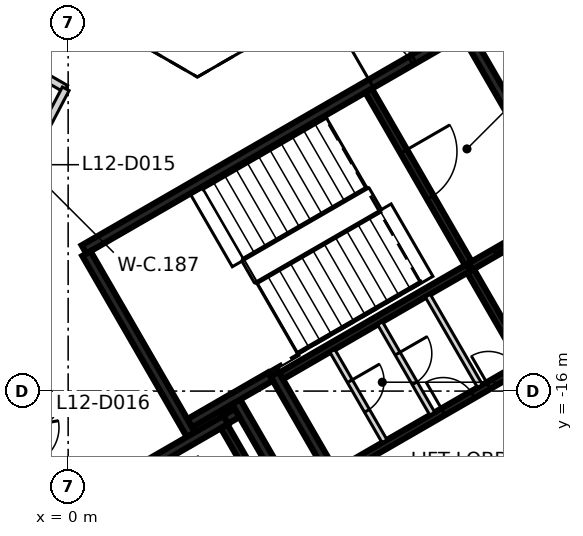
"""IFC4 building model, lengths in metres.
Left out: names, types, materials, properties, quantities, classifications, styles, units other than length and angle.
Written with IfcOpenShell. Run it as: python <this file> out.ifc"""

import sys

from ifc_helpers import new_model, si_unit, direction, frame, frame_2d, origin, place, context, subcontext, project, spatial, rectangle, extrude, element, fill, save


model = new_model("IFC4")
c1 = context("Model", 3, precision=1e-05, world=origin(), true_north=direction((0.0, 1.0)))
c2 = subcontext(c1, "Body", "Model", "MODEL_VIEW")
j1 = project(units=[si_unit("LENGTHUNIT", "METRE"), si_unit("PLANEANGLEUNIT", "RADIAN")], contexts=[c1])
p1 = place(None, origin())
s1 = spatial("IfcSite", under=j1, at=p1, CompositionType="ELEMENT")
p2 = place(p1, origin())
s2 = spatial("IfcBuilding", under=s1, at=p2, CompositionType="ELEMENT")
p3 = place(p2, frame((0.0, 0.0, 56.6)))
s3 = spatial("IfcBuildingStorey", under=s2, at=p3, CompositionType="ELEMENT", Elevation=56.6)
p4 = place(p3, frame((0.417, -12.273, 0.0), z_axis=(0.0, 0.0, 1.0), x_axis=(0.866021906294, 0.500006057782, 0.0)))
e1 = element("IfcWall", 1, at=p4, inside=s3, PredefinedType="SHEAR", context=c2, shape_type="SweptSolid", body=[
    extrude(rectangle(XDim=11.55, YDim=0.25, at=frame_2d((5.775, 0.0))), origin(), (0.0, 0.0, 1.0), 3.125),
])
p5 = place(p4, frame((10.025, 0.0, 0.0)))
e2 = element("IfcOpeningElement", 2, at=p5, cuts=e1, PredefinedType="OPENING", context=c2, shape_type="SweptSolid", body=[
    extrude(rectangle(XDim=1.2, YDim=2.1, at=frame_2d((0.6, 1.05))), frame((0.0, 0.135, 0.0), z_axis=(0.0, -1.0, 0.0), x_axis=(1.0, 0.0, 0.0)), (0.0, 0.0, 1.0), 0.27),
])
p6 = place(p4, frame((8.725, 0.0, 0.0)))
e3 = element("IfcOpeningElement", 3, at=p6, cuts=e1, PredefinedType="OPENING", context=c2, shape_type="SweptSolid", body=[
    extrude(rectangle(XDim=1.2, YDim=2.1, at=frame_2d((0.6, 1.05))), frame((0.0, 0.135, 0.0), z_axis=(0.0, -1.0, 0.0), x_axis=(1.0, 0.0, 0.0)), (0.0, 0.0, 1.0), 0.27),
])
p7 = place(p3, frame((3.235, -17.153, 0.0), z_axis=(0.0, 0.0, 1.0), x_axis=(-0.500008851346, 0.866020293397, 0.0)))
e4 = element("IfcWall", 4, at=p7, inside=s3, PredefinedType="SHEAR", context=c2, shape_type="SweptSolid", body=[
    extrude(rectangle(XDim=5.51, YDim=0.25, at=frame_2d((2.755, 0.0))), origin(), (0.0, 0.0, 1.0), 3.125),
])
p8 = place(p3, frame((10.483, -6.606, 0.0), z_axis=(0.0, 0.0, 1.0), x_axis=(0.49999885962, -0.866026062182, 0.0)))
e5 = element("IfcWall", 5, at=p8, inside=s3, PredefinedType="SHEAR", context=c2, shape_type="SweptSolid", body=[
    extrude(rectangle(XDim=5.225, YDim=0.25, at=frame_2d((2.612, 0.0))), origin(), (0.0, 0.0, 1.0), 3.125),
])
p9 = place(p3, frame((7.031, -18.327, 0.0), z_axis=(0.0, 0.0, 1.0), x_axis=(-0.499971222258, 0.866042017984, 0.0)))
e6 = element("IfcWall", 6, at=p9, inside=s3, PredefinedType="SHEAR", context=c2, shape_type="SweptSolid", body=[
    extrude(rectangle(XDim=3.2, YDim=0.25, at=frame_2d((1.6, 0.0))), origin(), (0.0, 0.0, 1.0), 3.125),
])
p10 = place(p3, frame((1.669, -18.19, 0.0), z_axis=(0.0, 0.0, 1.0), x_axis=(0.866042235819, 0.499970844928, 0.0)))
e7 = element("IfcWall", 7, at=p10, inside=s3, PredefinedType="SHEAR", context=c2, shape_type="SweptSolid", body=[
    extrude(rectangle(XDim=2.865, YDim=0.25, at=frame_2d((1.432, 0.0))), origin(), (0.0, 0.0, 1.0), 3.125),
])
p11 = place(p3, frame((4.414, -16.276, 0.0), z_axis=(0.0, 0.0, 1.0), x_axis=(0.500003324108, -0.866023484601, 0.0)))
e8 = element("IfcWall", 8, at=p11, inside=s3, PredefinedType="SHEAR", context=c2, shape_type="SweptSolid", body=[
    extrude(rectangle(XDim=3.085, YDim=0.25, at=frame_2d((1.542, 0.0))), origin(), (0.0, 0.0, 1.0), 3.125),
])
p12 = place(p3, frame((5.322, -15.619, 0.0), z_axis=(0.0, 0.0, 1.0), x_axis=(-0.866026229868, -0.499998569178, 0.0)))
e9 = element("IfcWall", 9, at=p12, inside=s3, PredefinedType="SHEAR", context=c2, shape_type="SweptSolid", body=[
    extrude(rectangle(XDim=2.449, YDim=0.25, at=frame_2d((1.225, 0.0))), origin(), (0.0, 0.0, 1.0), 3.125),
])
p13 = place(p3, frame((4.145, -16.749, 0.0), z_axis=(0.0, 0.0, 1.0), x_axis=(0.866185586049, 0.49972245349, 0.0)))
e10 = element("IfcWall", 10, at=p13, inside=s3, PredefinedType="SHEAR", context=c2, shape_type="SweptSolid", body=[
    extrude(rectangle(XDim=0.344, YDim=0.25, at=frame_2d((0.172, 0.0))), origin(), (0.0, 0.0, 1.0), 3.125),
])
p14 = place(p3, frame((9.052, -20.48, 0.0), z_axis=(0.0, 0.0, 1.0), x_axis=(0.866030299012, 0.499991521122, 0.0)))
e11 = element("IfcWall", 11, at=p14, inside=s3, PredefinedType="SHEAR", context=c2, shape_type="SweptSolid", body=[
    extrude(rectangle(XDim=6.1, YDim=0.2, at=frame_2d((3.05, 0.0))), origin(), (0.0, 0.0, 1.0), 3.125),
])
p15 = place(p14, frame((1.0, 0.0, 0.0)))
e12 = element("IfcOpeningElement", 12, at=p15, cuts=e11, PredefinedType="OPENING", context=c2, shape_type="SweptSolid", body=[
    extrude(rectangle(XDim=1.2, YDim=2.1, at=frame_2d((0.6, 1.05))), frame((0.0, 0.11, 0.0), z_axis=(0.0, -1.0, 0.0), x_axis=(1.0, 0.0, 0.0)), (0.0, 0.0, 1.0), 0.22),
])
p16 = place(p14, frame((4.05, 0.0, 0.0)))
e13 = element("IfcOpeningElement", 13, at=p16, cuts=e11, PredefinedType="OPENING", context=c2, shape_type="SweptSolid", body=[
    extrude(rectangle(XDim=1.2, YDim=2.1, at=frame_2d((0.6, 1.05))), frame((0.0, 0.11, 0.0), z_axis=(0.0, -1.0, 0.0), x_axis=(1.0, 0.0, 0.0)), (0.0, 0.0, 1.0), 0.22),
])
p17 = place(p3, frame((10.538, -12.752, 0.0), z_axis=(0.0, 0.0, 1.0), x_axis=(-0.866038630372, -0.499977090179, 0.0)))
e14 = element("IfcWall", 14, at=p17, inside=s3, PredefinedType="SHEAR", context=c2, shape_type="SweptSolid", body=[
    extrude(rectangle(XDim=5.699, YDim=0.2, at=frame_2d((2.85, 0.0))), origin(), (0.0, 0.0, 1.0), 3.125),
])
p18 = place(p3, frame((7.077, -18.156, 0.0), z_axis=(0.0, 0.0, 1.0), x_axis=(0.866038630372, 0.499977090179, 0.0)))
e15 = element("IfcWall", 15, at=p18, inside=s3, PredefinedType="SHEAR", context=c2, shape_type="SweptSolid", body=[
    extrude(rectangle(XDim=5.699, YDim=0.2, at=frame_2d((2.85, 0.0))), origin(), (0.0, 0.0, 1.0), 3.125),
])
p19 = place(p18, frame((3.224, 0.0, 0.0)))
e16 = element("IfcOpeningElement", 16, at=p19, cuts=e15, PredefinedType="OPENING", context=c2, shape_type="SweptSolid", body=[
    extrude(rectangle(XDim=0.9, YDim=2.1, at=frame_2d((0.45, 1.05))), frame((0.0, 0.11, 0.0), z_axis=(0.0, -1.0, 0.0), x_axis=(1.0, 0.0, 0.0)), (0.0, 0.0, 1.0), 0.22),
])
p20 = place(p18, frame((4.599, 0.0, 0.0)))
e17 = element("IfcOpeningElement", 17, at=p20, cuts=e15, PredefinedType="OPENING", context=c2, shape_type="SweptSolid", body=[
    extrude(rectangle(XDim=0.9, YDim=2.1, at=frame_2d((0.45, 1.05))), frame((0.0, 0.11, 0.0), z_axis=(0.0, -1.0, 0.0), x_axis=(1.0, 0.0, 0.0)), (0.0, 0.0, 1.0), 0.22),
])
p21 = place(p3, frame((7.906, -8.094, 0.0), z_axis=(0.0, 0.0, 1.0), x_axis=(0.500024287448, -0.866011380966, 0.0)))
e18 = element("IfcWall", 18, at=p21, inside=s3, PredefinedType="SHEAR", context=c2, shape_type="SweptSolid", body=[
    extrude(rectangle(XDim=5.251, YDim=0.2, at=frame_2d((2.625, 0.0))), origin(), (0.0, 0.0, 1.0), 3.125),
])
p22 = place(p21, frame((1.849, 0.0, 0.0)))
e19 = element("IfcOpeningElement", 19, at=p22, cuts=e18, PredefinedType="OPENING", context=c2, shape_type="SweptSolid", body=[
    extrude(rectangle(XDim=1.4, YDim=2.1, at=frame_2d((0.7, 1.05))), frame((0.0, 0.11, 0.0), z_axis=(0.0, -1.0, 0.0), x_axis=(1.0, 0.0, 0.0)), (0.0, 0.0, 1.0), 0.22),
])
p23 = place(p3, frame((5.503, -19.352, 0.0), z_axis=(0.0, 0.0, 1.0), x_axis=(-0.499986818241, 0.866033014143, 0.0)))
e20 = element("IfcWall", 20, at=p23, inside=s3, PredefinedType="SHEAR", context=c2, shape_type="SweptSolid", body=[
    extrude(rectangle(XDim=2.798, YDim=0.2, at=frame_2d((1.399, 0.0))), origin(), (0.0, 0.0, 1.0), 3.125),
])
p24 = place(p23, frame((0.949, 0.0, 0.0)))
e21 = element("IfcOpeningElement", 21, at=p24, cuts=e20, PredefinedType="OPENING", context=c2, shape_type="SweptSolid", body=[
    extrude(rectangle(XDim=0.9, YDim=2.1, at=frame_2d((0.45, 1.05))), frame((0.0, 0.11, 0.0), z_axis=(0.0, -1.0, 0.0), x_axis=(1.0, 0.0, 0.0)), (0.0, 0.0, 1.0), 0.22),
])
p25 = place(p3, frame((11.963, -15.22, 0.0), z_axis=(0.0, 0.0, 1.0), x_axis=(-0.500034990121, 0.866005201286, 0.0)))
e22 = element("IfcWall", 22, at=p25, inside=s3, PredefinedType="SHEAR", context=c2, shape_type="SweptSolid", body=[
    extrude(rectangle(XDim=2.75, YDim=0.2, at=frame_2d((1.375, 0.0))), origin(), (0.0, 0.0, 1.0), 3.125),
])
p26 = place(p3, frame((10.587, -12.723, 0.0), z_axis=(0.0, 0.0, 1.0), x_axis=(0.866037306777, 0.499979382845, 0.0)))
e23 = element("IfcWall", 23, at=p26, inside=s3, PredefinedType="SHEAR", context=c2, shape_type="SweptSolid", body=[
    extrude(rectangle(XDim=2.742, YDim=0.2, at=frame_2d((1.371, 0.0))), origin(), (0.0, 0.0, 1.0), 3.125),
])
p27 = place(p26, frame((0.743, 0.0, 0.0)))
e24 = element("IfcOpeningElement", 24, at=p27, cuts=e23, PredefinedType="OPENING", context=c2, shape_type="SweptSolid", body=[
    extrude(rectangle(XDim=1.3, YDim=2.1, at=frame_2d((0.65, 1.05))), frame((0.0, 0.11, 0.0), z_axis=(0.0, -1.0, 0.0), x_axis=(1.0, 0.0, 0.0)), (0.0, 0.0, 1.0), 0.22),
])
p28 = place(p3, frame((8.207, -14.214, 0.0), z_axis=(0.0, 0.0, 1.0), x_axis=(0.50002746344, -0.86600954718, 0.0)))
e25 = element("IfcWall", 25, at=p28, inside=s3, PredefinedType="PARTITIONING", context=c2, shape_type="SweptSolid", body=[
    extrude(rectangle(XDim=2.748, YDim=0.15, at=frame_2d((1.374, 0.0))), origin(), (0.0, 0.0, 1.0), 3.125),
])
p29 = place(p28, frame((0.924, 0.0, 0.0)))
e26 = element("IfcOpeningElement", 26, at=p29, cuts=e25, PredefinedType="OPENING", context=c2, shape_type="SweptSolid", body=[
    extrude(rectangle(XDim=0.9, YDim=2.1, at=frame_2d((0.45, 1.05))), frame((0.0, 0.085, 0.0), z_axis=(0.0, -1.0, 0.0), x_axis=(1.0, 0.0, 0.0)), (0.0, 0.0, 1.0), 0.17),
])
p30 = place(p3, frame((9.462, -13.489, 0.0), z_axis=(0.0, 0.0, 1.0), x_axis=(0.499988999718, -0.866031754707, 0.0)))
e27 = element("IfcWall", 27, at=p30, inside=s3, PredefinedType="PARTITIONING", context=c2, shape_type="SweptSolid", body=[
    extrude(rectangle(XDim=2.749, YDim=0.15, at=frame_2d((1.374, 0.0))), origin(), (0.0, 0.0, 1.0), 3.125),
])
p31 = place(p3, frame((6.951, -14.939, 0.0), z_axis=(0.0, 0.0, 1.0), x_axis=(0.499988999718, -0.866031754707, 0.0)))
e28 = element("IfcWall", 28, at=p31, inside=s3, PredefinedType="PARTITIONING", context=c2, shape_type="SweptSolid", body=[
    extrude(rectangle(XDim=2.749, YDim=0.15, at=frame_2d((1.374, 0.0))), origin(), (0.0, 0.0, 1.0), 3.125),
])
p32 = place(p31, frame((0.924, 0.0, 0.0)))
e29 = element("IfcOpeningElement", 29, at=p32, cuts=e28, PredefinedType="OPENING", context=c2, shape_type="SweptSolid", body=[
    extrude(rectangle(XDim=0.9, YDim=2.1, at=frame_2d((0.45, 1.05))), frame((0.0, 0.085, 0.0), z_axis=(0.0, -1.0, 0.0), x_axis=(1.0, 0.0, 0.0)), (0.0, 0.0, 1.0), 0.17),
])
p33 = place(p3, frame((-7.589, -3.702, 0.0), z_axis=(0.0, 0.0, 1.0), x_axis=(0.865995139556, -0.500052415518, 0.0)))
e30 = element("IfcWall", 30, at=p33, inside=s3, PredefinedType="PARTITIONING", context=c2, shape_type="SweptSolid", body=[
    extrude(rectangle(XDim=8.689, YDim=0.2, at=frame_2d((4.344, 0.0))), origin(), (0.0, 0.0, 1.0), 3.125),
])
p34 = place(p33, frame((0.749, 0.0, 0.0)))
e31 = element("IfcOpeningElement", 31, at=p34, cuts=e30, PredefinedType="OPENING", context=c2, shape_type="SweptSolid", body=[
    extrude(rectangle(XDim=1.0, YDim=2.1, at=frame_2d((0.5, 1.05))), frame((0.0, 0.11, 0.0), z_axis=(0.0, -1.0, 0.0), x_axis=(1.0, 0.0, 0.0)), (0.0, 0.0, 1.0), 0.22),
])
p35 = place(p33, frame((5.819, 0.0, 0.0)))
e32 = element("IfcOpeningElement", 32, at=p35, cuts=e30, PredefinedType="OPENING", context=c2, shape_type="SweptSolid", body=[
    extrude(rectangle(XDim=0.95, YDim=2.1, at=frame_2d((0.475, 1.05))), frame((0.0, 0.11, 0.0), z_axis=(0.0, -1.0, 0.0), x_axis=(1.0, 0.0, 0.0)), (0.0, 0.0, 1.0), 0.22),
])
p36 = place(p3, frame((-2.162, -12.041, 0.0), z_axis=(0.0, 0.0, 1.0), x_axis=(0.464956890881, 0.885333321197, 0.0)))
e33 = element("IfcWall", 33, at=p36, inside=s3, PredefinedType="PARTITIONING", context=c2, shape_type="SweptSolid", body=[
    extrude(rectangle(XDim=4.512, YDim=0.2, at=frame_2d((2.256, 0.0))), origin(), (0.0, 0.0, 1.0), 3.125),
])
p37 = place(p36, frame((1.756, 0.0, 0.0)))
e34 = element("IfcOpeningElement", 34, at=p37, cuts=e33, PredefinedType="OPENING", context=c2, shape_type="SweptSolid", body=[
    extrude(rectangle(XDim=1.0, YDim=2.1, at=frame_2d((0.5, 1.05))), frame((0.0, 0.11, 0.0), z_axis=(0.0, -1.0, 0.0), x_axis=(1.0, 0.0, 0.0)), (0.0, 0.0, 1.0), 0.22),
])
p38 = place(p27, origin())
e35 = element("IfcDoor", 35, at=p38, inside=s3, OperationType="SLIDING_TO_LEFT", PredefinedType="DOOR", context=c2, shape_type="SweptSolid", body=[
    extrude(rectangle(XDim=1.3, YDim=2.1, at=frame_2d((0.65, 1.05))), frame((0.0, 0.025, 0.0), z_axis=(0.0, -1.0, 0.0), x_axis=(1.0, 0.0, 0.0)), (0.0, 0.0, 1.0), 0.05),
])
fill(e24, e35)
p39 = place(p5, origin())
e36 = element("IfcDoor", 36, at=p39, inside=s3, OperationType="SINGLE_SWING_LEFT", PredefinedType="DOOR", context=c2, shape_type="SweptSolid", body=[
    extrude(rectangle(XDim=1.2, YDim=2.1, at=frame_2d((0.6, 1.05))), frame((0.0, 0.025, 0.0), z_axis=(0.0, -1.0, 0.0), x_axis=(1.0, 0.0, 0.0)), (0.0, 0.0, 1.0), 0.05),
])
fill(e2, e36)
p40 = place(p6, origin())
e37 = element("IfcDoor", 37, at=p40, inside=s3, OperationType="SINGLE_SWING_RIGHT", PredefinedType="DOOR", context=c2, shape_type="SweptSolid", body=[
    extrude(rectangle(XDim=1.2, YDim=2.1, at=frame_2d((0.6, 1.05))), frame((0.0, 0.025, 0.0), z_axis=(0.0, -1.0, 0.0), x_axis=(1.0, 0.0, 0.0)), (0.0, 0.0, 1.0), 0.05),
])
fill(e3, e37)
p41 = place(p22, origin())
e38 = element("IfcDoor", 38, at=p41, inside=s3, OperationType="SINGLE_SWING_LEFT", PredefinedType="DOOR", context=c2, shape_type="SweptSolid", body=[
    extrude(rectangle(XDim=1.4, YDim=2.1, at=frame_2d((0.7, 1.05))), frame((0.0, 0.025, 0.0), z_axis=(0.0, -1.0, 0.0), x_axis=(1.0, 0.0, 0.0)), (0.0, 0.0, 1.0), 0.05),
])
fill(e19, e38)
p42 = place(p19, origin())
e39 = element("IfcDoor", 39, at=p42, inside=s3, OperationType="SINGLE_SWING_RIGHT", PredefinedType="DOOR", context=c2, shape_type="SweptSolid", body=[
    extrude(rectangle(XDim=0.9, YDim=2.1, at=frame_2d((0.45, 1.05))), frame((0.0, 0.025, 0.0), z_axis=(0.0, -1.0, 0.0), x_axis=(1.0, 0.0, 0.0)), (0.0, 0.0, 1.0), 0.05),
])
fill(e16, e39)
p43 = place(p20, origin())
e40 = element("IfcDoor", 40, at=p43, inside=s3, OperationType="SINGLE_SWING_LEFT", PredefinedType="DOOR", context=c2, shape_type="SweptSolid", body=[
    extrude(rectangle(XDim=0.9, YDim=2.1, at=frame_2d((0.45, 1.05))), frame((0.0, 0.025, 0.0), z_axis=(0.0, -1.0, 0.0), x_axis=(1.0, 0.0, 0.0)), (0.0, 0.0, 1.0), 0.05),
])
fill(e17, e40)
p44 = place(p29, origin())
e41 = element("IfcDoor", 41, at=p44, inside=s3, OperationType="SINGLE_SWING_LEFT", PredefinedType="DOOR", context=c2, shape_type="SweptSolid", body=[
    extrude(rectangle(XDim=0.9, YDim=2.1, at=frame_2d((0.45, 1.05))), frame((0.0, 0.025, 0.0), z_axis=(0.0, -1.0, 0.0), x_axis=(1.0, 0.0, 0.0)), (0.0, 0.0, 1.0), 0.05),
])
fill(e26, e41)
p45 = place(p32, origin())
e42 = element("IfcDoor", 42, at=p45, inside=s3, OperationType="SINGLE_SWING_RIGHT", PredefinedType="DOOR", context=c2, shape_type="SweptSolid", body=[
    extrude(rectangle(XDim=0.9, YDim=2.1, at=frame_2d((0.45, 1.05))), frame((0.0, 0.025, 0.0), z_axis=(0.0, -1.0, 0.0), x_axis=(1.0, 0.0, 0.0)), (0.0, 0.0, 1.0), 0.05),
])
fill(e29, e42)
save(model, sys.argv[1])
